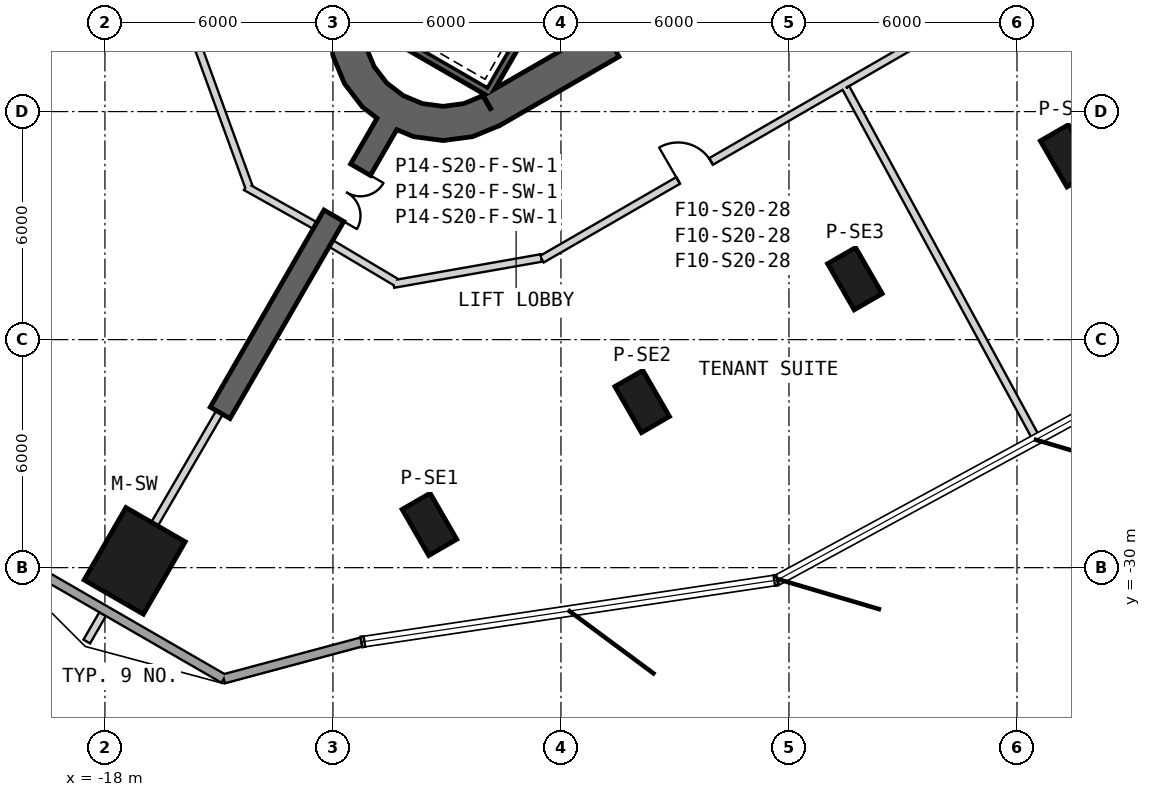
"""IFC4 building model, lengths in metres.
Left out: names, types, materials, properties, quantities, classifications, styles, units other than length and angle.
Written with IfcOpenShell. Run it as: python <this file> out.ifc"""

import sys

from ifc_helpers import new_model, si_unit, direction, frame, frame_2d, origin, origin_2d, place, context, subcontext, project, spatial, polyline, rectangle, outline, extrude, element, fill, save


model = new_model("IFC4")
c1 = context("Model", 3, precision=1e-05, world=origin(), true_north=direction((0.0, 1.0)))
c2 = subcontext(c1, "Body", "Model", "MODEL_VIEW")
j1 = project(units=[si_unit("LENGTHUNIT", "METRE"), si_unit("PLANEANGLEUNIT", "RADIAN")], contexts=[c1])
p1 = place(None, origin())
s1 = spatial("IfcSite", under=j1, at=p1, CompositionType="ELEMENT")
p2 = place(p1, origin())
s2 = spatial("IfcBuilding", under=s1, at=p2, CompositionType="ELEMENT")
p3 = place(p2, frame((0.0, 0.0, 322.1)))
s3 = spatial("IfcBuildingStorey", under=s2, at=p3, CompositionType="ELEMENT", Elevation=322.1)
p4 = place(p3, frame((-17.218, -29.822, 0.0), z_axis=(0.0, 0.0, 1.0), x_axis=(-0.5, -0.866025403784, 0.0)))
e1 = element("IfcColumn", 1, at=p4, inside=s3, PredefinedType="COLUMN", context=c2, shape_type="SweptSolid", body=[
    extrude(rectangle(XDim=2.2, YDim=1.8, at=origin_2d()), origin(), (0.0, 0.0, 1.0), 3.9),
])
for number, where, z_axis, x_axis in (
    (2, (-9.461, -28.861, 0.0), (0.0, 0.0, 1.0), (0.5, -0.866, 0.0)),
    (3, (-3.863, -25.629, 0.0), (0.0, 0.0, 1.0), (0.5, -0.866, 0.0)),
    (4, (1.735, -22.397, 0.0), (0.0, 0.0, 1.0), (0.5, -0.866, 0.0)),
    (5, (7.333, -19.165, 0.0), (0.0, 0.0, 1.0), (0.5, -0.866, 0.0)),
):
    element("IfcColumn", number, at=place(p3, frame(where, z_axis=z_axis, x_axis=x_axis)), inside=s3, PredefinedType="COLUMN", context=c2, shape_type="SweptSolid", body=[
        extrude(rectangle(XDim=1.4, YDim=0.85, at=origin_2d()), origin(), (0.0, 0.0, 1.0), 3.9),
    ])
p5 = place(p3, frame((-7.825, -17.97, 0.0), z_axis=(0.0, 0.0, 1.0), x_axis=(0.866028369851, 0.499994862586, 0.0)))
e6 = element("IfcWall", 6, at=p5, inside=s3, PredefinedType="SHEAR", context=c2, shape_type="SweptSolid", body=[
    extrude(rectangle(XDim=31.523, YDim=0.9, at=frame_2d((15.762, 0.0))), origin(), (0.0, 0.0, 1.0), 3.9),
])
p6 = place(p5, frame((17.862, 0.0, 0.0)))
e7 = element("IfcOpeningElement", 7, at=p6, cuts=e6, PredefinedType="OPENING", context=c2, shape_type="SweptSolid", body=[
    extrude(rectangle(XDim=1.2, YDim=2.4, at=frame_2d((0.6, 1.2))), frame((0.0, 0.46, 0.0), z_axis=(0.0, -1.0, 0.0), x_axis=(1.0, 0.0, 0.0)), (0.0, 0.0, 1.0), 0.92),
])
p7 = place(p5, frame((20.562, 0.0, 0.0)))
e8 = element("IfcOpeningElement", 8, at=p7, cuts=e6, PredefinedType="OPENING", context=c2, shape_type="SweptSolid", body=[
    extrude(rectangle(XDim=1.2, YDim=2.4, at=frame_2d((0.6, 1.2))), frame((0.0, 0.46, 0.0), z_axis=(0.0, -1.0, 0.0), x_axis=(1.0, 0.0, 0.0)), (0.0, 0.0, 1.0), 0.92),
])
p8 = place(p5, frame((26.712, 0.0, 0.0)))
e9 = element("IfcOpeningElement", 9, at=p8, cuts=e6, PredefinedType="OPENING", context=c2, shape_type="SweptSolid", body=[
    extrude(rectangle(XDim=1.2, YDim=2.4, at=frame_2d((0.6, 1.2))), frame((0.0, 0.46, 0.0), z_axis=(0.0, -1.0, 0.0), x_axis=(1.0, 0.0, 0.0)), (0.0, 0.0, 1.0), 0.92),
])
p9 = place(p5, frame((3.612, 0.0, 0.0)))
e10 = element("IfcOpeningElement", 10, at=p9, cuts=e6, PredefinedType="OPENING", context=c2, shape_type="SweptSolid", body=[
    extrude(rectangle(XDim=1.2, YDim=2.4, at=frame_2d((0.6, 1.2))), frame((0.0, 0.46, 0.0), z_axis=(0.0, -1.0, 0.0), x_axis=(1.0, 0.0, 0.0)), (0.0, 0.0, 1.0), 0.92),
])
p10 = place(p3, origin())
e11 = element("IfcWall", 11, at=p10, inside=s3, PredefinedType="SHEAR", context=c2, shape_type="SweptSolid", body=[
    extrude(outline(polyline([(-12.1, -15.762), (-11.998, -16.538), (-11.698, -17.262), (-11.221, -17.883), (-10.6, -18.36), (-9.876, -18.659), (-9.1, -18.762), (-8.323, -18.659), (-7.6, -18.36), (-8.05, -17.58), (-8.556, -17.79), (-9.1, -17.862), (-9.644, -17.79), (-10.15, -17.58), (-10.585, -17.247), (-10.919, -16.812), (-11.128, -16.305), (-11.2, -15.762), (-12.1, -15.762)])), origin(), (0.0, 0.0, 1.0), 3.9),
])
p11 = place(p3, frame((-10.575, -18.316, 0.0), z_axis=(0.0, 0.0, 1.0), x_axis=(-0.499987805019, -0.866032444446, 0.0)))
e12 = element("IfcWall", 12, at=p11, inside=s3, PredefinedType="SHEAR", context=c2, shape_type="SweptSolid", body=[
    extrude(rectangle(XDim=8.787, YDim=0.6, at=frame_2d((4.394, 0.0))), origin(), (0.0, 0.0, 1.0), 3.9),
])
p12 = place(p11, frame((1.4, 0.0, 0.0)))
e13 = element("IfcOpeningElement", 13, at=p12, cuts=e12, PredefinedType="OPENING", context=c2, shape_type="SweptSolid", body=[
    extrude(rectangle(XDim=1.4, YDim=2.4, at=frame_2d((0.7, 1.2))), frame((0.0, 0.31, 0.0), z_axis=(0.0, -1.0, 0.0), x_axis=(1.0, 0.0, 0.0)), (0.0, 0.0, 1.0), 0.62),
])
p13 = place(p3, frame((-21.079, -29.342, 0.0), z_axis=(0.0, 0.0, 1.0), x_axis=(0.866029611329, -0.499992712247, 0.0)))
e14 = element("IfcWall", 14, at=p13, inside=s3, PredefinedType="SOLIDWALL", context=c2, shape_type="SweptSolid", body=[
    extrude(rectangle(XDim=7.168, YDim=0.24, at=frame_2d((3.584, 0.0))), origin(), (0.0, 0.0, 1.0), 3.6),
])
p14 = place(p3, frame((-14.871, -32.926, 0.0), z_axis=(0.0, 0.0, 1.0), x_axis=(0.965921891913, 0.258833727946, 0.0)))
e15 = element("IfcWall", 15, at=p14, inside=s3, PredefinedType="SOLIDWALL", context=c2, shape_type="SweptSolid", body=[
    extrude(rectangle(XDim=3.749, YDim=0.24, at=frame_2d((1.875, 0.0))), origin(), (0.0, 0.0, 1.0), 3.6),
])
p15 = place(p3, frame((-3.905, -10.563, -0.3), z_axis=(0.0, 0.0, 1.0), x_axis=(-0.500012932018, -0.866017937352, 0.0)))
e16 = element("IfcWall", 16, at=p15, inside=s3, PredefinedType="SHEAR", context=c2, shape_type="SweptSolid", body=[
    extrude(rectangle(XDim=8.1, YDim=0.2, at=frame_2d((4.05, 0.0))), origin(), (0.0, 0.0, 1.0), 3.9),
])
p16 = place(p3, frame((-11.282, -15.541, -0.3), z_axis=(0.0, 0.0, 1.0), x_axis=(0.866000483506, -0.500043160704, 0.0)))
e17 = element("IfcWall", 17, at=p16, inside=s3, PredefinedType="SHEAR", context=c2, shape_type="SweptSolid", body=[
    extrude(rectangle(XDim=3.8, YDim=0.2, at=frame_2d((1.9, 0.0))), origin(), (0.0, 0.0, 1.0), 3.9),
])
p17 = place(p3, frame((-14.293, -19.978, 0.0), z_axis=(0.0, 0.0, 1.0), x_axis=(0.872510000486, -0.48859625362, 0.0)))
e18 = element("IfcWall", 18, at=p17, inside=s3, PredefinedType="PARTITIONING", context=c2, shape_type="SweptSolid", body=[
    extrude(rectangle(XDim=2.09, YDim=0.2, at=frame_2d((1.045, 0.0))), origin(), (0.0, 0.0, 1.0), 3.6),
])
p18 = place(p3, frame((-15.534, -16.346, 0.0), z_axis=(0.0, 0.0, 1.0), x_axis=(0.342001008711, -0.939699584996, 0.0)))
e19 = element("IfcWall", 19, at=p18, inside=s3, PredefinedType="PARTITIONING", context=c2, shape_type="SweptSolid", body=[
    extrude(rectangle(XDim=3.875, YDim=0.2, at=frame_2d((1.938, 0.0))), origin(), (0.0, 0.0, 1.0), 2.88),
])
p19 = place(p3, frame((-6.505, -21.885, 0.0), z_axis=(0.0, 0.0, 1.0), x_axis=(0.86602457258, 0.500001439686, 0.0)))
e20 = element("IfcWall", 20, at=p19, inside=s3, PredefinedType="PARTITIONING", context=c2, shape_type="SweptSolid", body=[
    extrude(rectangle(XDim=32.952, YDim=0.2, at=frame_2d((16.476, 0.0))), origin(), (0.0, 0.0, 1.0), 2.97),
])
p20 = place(p19, frame((20.569, 0.0, 0.0)))
e21 = element("IfcOpeningElement", 21, at=p20, cuts=e20, PredefinedType="OPENING", context=c2, shape_type="SweptSolid", body=[
    extrude(rectangle(XDim=1.0, YDim=2.1, at=frame_2d((0.5, 1.05))), frame((0.0, 0.11, 0.0), z_axis=(0.0, -1.0, 0.0), x_axis=(1.0, 0.0, 0.0)), (0.0, 0.0, 1.0), 0.22),
])
p21 = place(p19, frame((4.143, 0.0, 0.0)))
e22 = element("IfcOpeningElement", 22, at=p21, cuts=e20, PredefinedType="OPENING", context=c2, shape_type="SweptSolid", body=[
    extrude(rectangle(XDim=1.0, YDim=2.1, at=frame_2d((0.5, 1.05))), frame((0.0, 0.11, 0.0), z_axis=(0.0, -1.0, 0.0), x_axis=(1.0, 0.0, 0.0)), (0.0, 0.0, 1.0), 0.22),
])
p22 = place(p3, frame((-10.406, -22.538, 0.0), z_axis=(0.0, 0.0, 1.0), x_axis=(0.98480284819, 0.173675991999, 0.0)))
e23 = element("IfcWall", 23, at=p22, inside=s3, PredefinedType="PARTITIONING", context=c2, shape_type="SweptSolid", body=[
    extrude(rectangle(XDim=3.949, YDim=0.2, at=frame_2d((1.974, 0.0))), origin(), (0.0, 0.0, 1.0), 2.88),
])
p23 = place(p3, frame((-12.05, -21.472, 0.0), z_axis=(0.0, 0.0, 1.0), x_axis=(0.859577966481, -0.511004617924, 0.0)))
e24 = element("IfcWall", 24, at=p23, inside=s3, PredefinedType="PARTITIONING", context=c2, shape_type="SweptSolid", body=[
    extrude(rectangle(XDim=1.998, YDim=0.2, at=frame_2d((0.999, 0.0))), origin(), (0.0, 0.0, 1.0), 3.6),
])
p24 = place(p3, frame((-18.477, -31.944, 0.0), z_axis=(0.0, 0.0, 1.0), x_axis=(0.499798627271, 0.866141635172, 0.0)))
e25 = element("IfcWall", 25, at=p24, inside=s3, PredefinedType="PARTITIONING", context=c2, shape_type="SweptSolid", body=[
    extrude(rectangle(XDim=0.832, YDim=0.2, at=frame_2d((0.416, 0.0))), origin(), (0.0, 0.0, 1.0), 3.6),
])
p25 = place(p3, frame((-16.694, -28.854, 0.0), z_axis=(0.0, 0.0, 1.0), x_axis=(0.503017521745, 0.864276213266, 0.0)))
e26 = element("IfcWall", 26, at=p25, inside=s3, PredefinedType="PARTITIONING", context=c2, shape_type="SweptSolid", body=[
    extrude(rectangle(XDim=3.398, YDim=0.2, at=frame_2d((1.699, 0.0))), origin(), (0.0, 0.0, 1.0), 3.17),
])
p26 = place(p3, frame((1.499, -17.379, 0.0), z_axis=(0.0, 0.0, 1.0), x_axis=(0.477249140753, -0.87876803404, 0.0)))
e27 = element("IfcWall", 27, at=p26, inside=s3, PredefinedType="PARTITIONING", context=c2, shape_type="SweptSolid", body=[
    extrude(rectangle(XDim=10.516, YDim=0.2, at=frame_2d((5.258, 0.0))), origin(), (0.0, 0.0, 1.0), 2.97),
])
p27 = place(p21, origin())
e28 = element("IfcDoor", 28, at=p27, inside=s3, OperationType="SINGLE_SWING_RIGHT", PredefinedType="USERDEFINED", context=c2, shape_type="SweptSolid", body=[
    extrude(rectangle(XDim=1.0, YDim=2.1, at=frame_2d((0.5, 1.05))), frame((0.0, 0.025, 0.0), z_axis=(0.0, -1.0, 0.0), x_axis=(1.0, 0.0, 0.0)), (0.0, 0.0, 1.0), 0.05),
])
fill(e22, e28)
p28 = place(p12, origin())
e29 = element("IfcDoor", 29, at=p28, inside=s3, OperationType="DOUBLE_DOOR_SINGLE_SWING", PredefinedType="NOTDEFINED", context=c2, shape_type="SweptSolid", body=[
    extrude(rectangle(XDim=1.4, YDim=2.4, at=frame_2d((0.7, 1.2))), frame((0.0, 0.025, 0.0), z_axis=(0.0, -1.0, 0.0), x_axis=(1.0, 0.0, 0.0)), (0.0, 0.0, 1.0), 0.05),
])
fill(e13, e29)
save(model, sys.argv[1])
